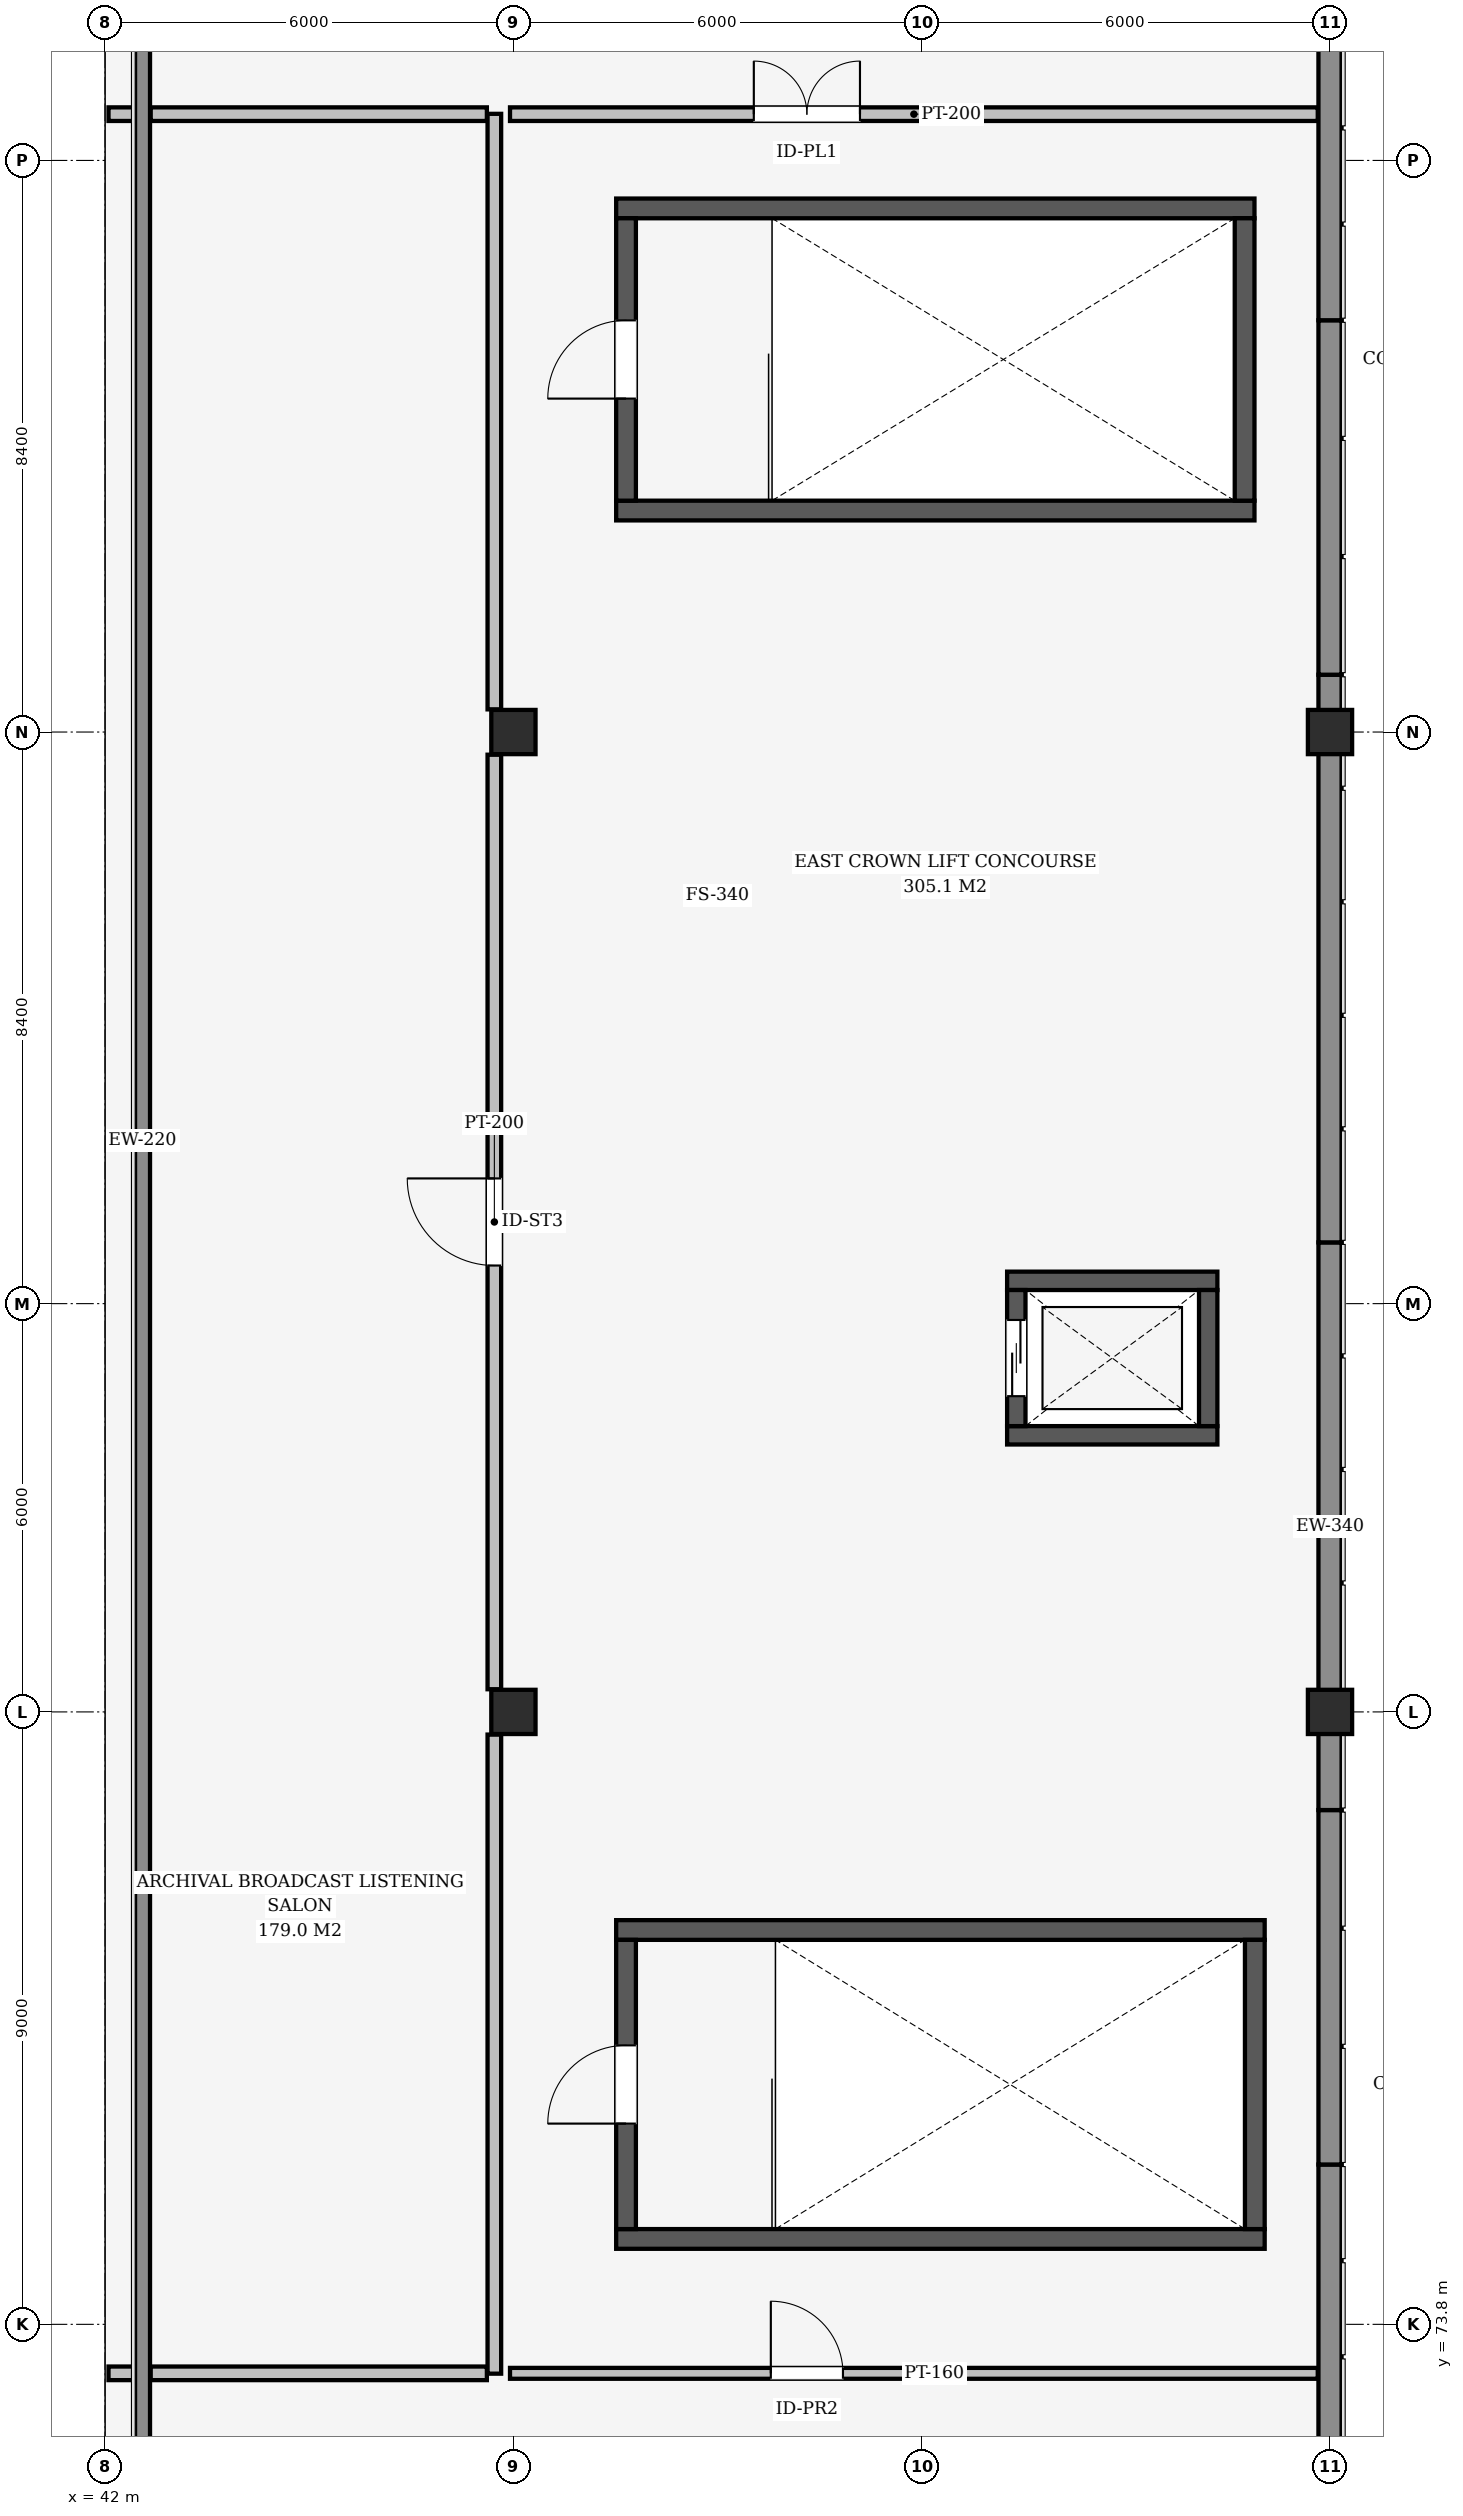
"""IFC4 building model, lengths in metres.
Left out: names, types, materials, properties, quantities, classifications, styles, units other than length and angle.
Written with IfcOpenShell. Run it as: python <this file> out.ifc"""

import sys

from ifc_helpers import new_model, si_unit, direction, frame, frame_2d, origin, origin_2d, place, context, subcontext, project, spatial, polyline, rectangle, outline, extrude, element, fill, save


model = new_model("IFC4")
c1 = context("Model", 3, precision=1e-05, world=origin(), true_north=direction((0.0, 1.0)))
c2 = subcontext(c1, "Body", "Model", "MODEL_VIEW")
j1 = project(units=[si_unit("LENGTHUNIT", "METRE"), si_unit("PLANEANGLEUNIT", "RADIAN")], contexts=[c1])
p1 = place(None, origin())
s1 = spatial("IfcSite", under=j1, at=p1, CompositionType="ELEMENT")
p2 = place(p1, origin())
s2 = spatial("IfcBuilding", under=s1, at=p2, CompositionType="ELEMENT")
p3 = place(p2, frame((0.0, 0.0, 22.2)))
s3 = spatial("IfcBuildingStorey", under=s2, at=p3, CompositionType="ELEMENT", Elevation=22.2)
for number, where, z_axis, x_axis in (
    (1, (48.0, 82.8, 0.0), (0.0, 0.0, 1.0), (1.0, 0.0, 0.0)),
    (2, (48.0, 97.2, 0.0), (0.0, 0.0, 1.0), (1.0, 0.0, 0.0)),
    (3, (60.0, 82.8, 0.0), (0.0, 0.0, 1.0), (1.0, 0.0, 0.0)),
    (4, (60.0, 97.2, 0.0), (0.0, 0.0, 1.0), (1.0, 0.0, 0.0)),
):
    element("IfcColumn", number, at=place(p3, frame(where, z_axis=z_axis, x_axis=x_axis)), inside=s3, PredefinedType="COLUMN", context=c2, shape_type="SweptSolid", body=[
        extrude(rectangle(XDim=0.65, YDim=0.65, at=origin_2d()), origin(), (0.0, 0.0, 1.0), 4.5),
    ])
p4 = place(p3, frame((42.55, 68.64, 0.0), z_axis=(0.0, 0.0, 1.0), x_axis=(0.0, 1.0, 0.0)))
e5 = element("IfcWall", 5, at=p4, inside=s3, PredefinedType="SOLIDWALL", context=c2, shape_type="SweptSolid", body=[
    extrude(rectangle(XDim=45.12, YDim=0.22, at=frame_2d((22.56, 0.0))), origin(), (0.0, 0.0, 1.0), 3.15),
])
p5 = place(p3, frame((60.0, 76.149, 0.0), z_axis=(0.0, 0.0, 1.0), x_axis=(0.0, -1.0, 0.0)))
e6 = element("IfcWall", 6, at=p5, inside=s3, PredefinedType="SOLIDWALL", context=c2, shape_type="SweptSolid", body=[
    extrude(outline(polyline([(0.0, 0.0), (4.24, 0.0), (4.24, 4.463), (0.0, 8.163), (0.0, 0.0)])), frame((0.0, 0.17, 0.0), z_axis=(0.0, -1.0, 0.0), x_axis=(1.0, 0.0, 0.0)), (0.0, 0.0, 1.0), 0.34),
])
p6 = place(p3, frame((60.0, 81.358, 0.0), z_axis=(0.0, 0.0, 1.0), x_axis=(0.0, -1.0, 0.0)))
e7 = element("IfcWall", 7, at=p6, inside=s3, PredefinedType="SOLIDWALL", context=c2, shape_type="SweptSolid", body=[
    extrude(outline(polyline([(0.0, 0.0), (5.209, 0.0), (5.209, 8.163), (0.0, 10.859), (0.0, 0.0)])), frame((0.0, 0.17, 0.0), z_axis=(0.0, -1.0, 0.0), x_axis=(1.0, 0.0, 0.0)), (0.0, 0.0, 1.0), 0.34),
])
p7 = place(p3, frame((60.0, 89.7, 0.0), z_axis=(0.0, 0.0, 1.0), x_axis=(0.0, -1.0, 0.0)))
e8 = element("IfcWall", 8, at=p7, inside=s3, PredefinedType="SOLIDWALL", context=c2, shape_type="SweptSolid", body=[
    extrude(outline(polyline([(0.0, 0.0), (8.342, 0.0), (8.342, 10.859), (0.0, 12.355), (0.0, 0.0)])), frame((0.0, 0.17, 0.0), z_axis=(0.0, -1.0, 0.0), x_axis=(1.0, 0.0, 0.0)), (0.0, 0.0, 1.0), 0.34),
])
p8 = place(p3, frame((60.0, 98.042, 0.0), z_axis=(0.0, 0.0, 1.0), x_axis=(0.0, -1.0, 0.0)))
e9 = element("IfcWall", 9, at=p8, inside=s3, PredefinedType="SOLIDWALL", context=c2, shape_type="SweptSolid", body=[
    extrude(outline(polyline([(0.0, 0.0), (8.342, 0.0), (8.342, 12.355), (0.0, 10.859), (0.0, 0.0)])), frame((0.0, 0.17, 0.0), z_axis=(0.0, -1.0, 0.0), x_axis=(1.0, 0.0, 0.0)), (0.0, 0.0, 1.0), 0.34),
])
p9 = place(p3, frame((60.0, 103.251, 0.0), z_axis=(0.0, 0.0, 1.0), x_axis=(0.0, -1.0, 0.0)))
e10 = element("IfcWall", 10, at=p9, inside=s3, PredefinedType="SOLIDWALL", context=c2, shape_type="SweptSolid", body=[
    extrude(outline(polyline([(0.0, 0.0), (5.209, 0.0), (5.209, 10.859), (0.0, 8.163), (0.0, 0.0)])), frame((0.0, 0.17, 0.0), z_axis=(0.0, -1.0, 0.0), x_axis=(1.0, 0.0, 0.0)), (0.0, 0.0, 1.0), 0.34),
])
p10 = place(p3, frame((60.0, 107.491, 0.0), z_axis=(0.0, 0.0, 1.0), x_axis=(0.0, -1.0, 0.0)))
e11 = element("IfcWall", 11, at=p10, inside=s3, PredefinedType="SOLIDWALL", context=c2, shape_type="SweptSolid", body=[
    extrude(outline(polyline([(0.0, 0.0), (4.24, 0.0), (4.24, 8.163), (0.0, 4.463), (0.0, 0.0)])), frame((0.0, 0.17, 0.0), z_axis=(0.0, -1.0, 0.0), x_axis=(1.0, 0.0, 0.0)), (0.0, 0.0, 1.0), 0.34),
])
for number, where, z_axis, x_axis in (
    (12, (49.51, 100.455, 0.0), (0.0, 0.0, 1.0), (1.0, 0.0, 0.0)),
    (13, (49.51, 104.895, 0.0), (0.0, 0.0, 1.0), (1.0, 0.0, 0.0)),
):
    element("IfcWall", number, at=place(p3, frame(where, z_axis=z_axis, x_axis=x_axis)), inside=s3, PredefinedType="SHEAR", context=c2, shape_type="SweptSolid", body=[
        extrude(rectangle(XDim=9.38, YDim=0.29, at=frame_2d((4.69, 0.0))), origin(), (0.0, 0.0, 1.0), 4.5),
    ])
p11 = place(p3, frame((49.655, 100.6, 0.0), z_axis=(0.0, 0.0, 1.0), x_axis=(0.0, 1.0, 0.0)))
e14 = element("IfcWall", 14, at=p11, inside=s3, PredefinedType="SHEAR", context=c2, shape_type="SweptSolid", body=[
    extrude(rectangle(XDim=4.15, YDim=0.29, at=frame_2d((2.075, 0.0))), origin(), (0.0, 0.0, 1.0), 4.5),
])
p12 = place(p11, frame((1.5, 0.0, 0.0)))
e15 = element("IfcOpeningElement", 15, at=p12, cuts=e14, PredefinedType="OPENING", context=c2, shape_type="SweptSolid", body=[
    extrude(rectangle(XDim=1.15, YDim=2.15, at=frame_2d((0.575, 1.075))), frame((0.0, 0.155, 0.0), z_axis=(0.0, -1.0, 0.0), x_axis=(1.0, 0.0, 0.0)), (0.0, 0.0, 1.0), 0.31),
])
p13 = place(p3, frame((58.745, 100.6, 0.0), z_axis=(0.0, 0.0, 1.0), x_axis=(0.0, 1.0, 0.0)))
e16 = element("IfcWall", 16, at=p13, inside=s3, PredefinedType="SHEAR", context=c2, shape_type="SweptSolid", body=[
    extrude(rectangle(XDim=4.15, YDim=0.29, at=frame_2d((2.075, 0.0))), origin(), (0.0, 0.0, 1.0), 4.5),
])
for number, where, z_axis, x_axis in (
    (17, (49.51, 75.055, 0.0), (0.0, 0.0, 1.0), (1.0, 0.0, 0.0)),
    (18, (49.51, 79.595, 0.0), (0.0, 0.0, 1.0), (1.0, 0.0, 0.0)),
):
    element("IfcWall", number, at=place(p3, frame(where, z_axis=z_axis, x_axis=x_axis)), inside=s3, PredefinedType="SHEAR", context=c2, shape_type="SweptSolid", body=[
        extrude(rectangle(XDim=9.53, YDim=0.29, at=frame_2d((4.765, 0.0))), origin(), (0.0, 0.0, 1.0), 4.5),
    ])
p14 = place(p3, frame((49.655, 75.2, 0.0), z_axis=(0.0, 0.0, 1.0), x_axis=(0.0, 1.0, 0.0)))
e19 = element("IfcWall", 19, at=p14, inside=s3, PredefinedType="SHEAR", context=c2, shape_type="SweptSolid", body=[
    extrude(rectangle(XDim=4.25, YDim=0.29, at=frame_2d((2.125, 0.0))), origin(), (0.0, 0.0, 1.0), 4.5),
])
p15 = place(p14, frame((1.55, 0.0, 0.0)))
e20 = element("IfcOpeningElement", 20, at=p15, cuts=e19, PredefinedType="OPENING", context=c2, shape_type="SweptSolid", body=[
    extrude(rectangle(XDim=1.15, YDim=2.15, at=frame_2d((0.575, 1.075))), frame((0.0, 0.155, 0.0), z_axis=(0.0, -1.0, 0.0), x_axis=(1.0, 0.0, 0.0)), (0.0, 0.0, 1.0), 0.31),
])
p16 = place(p3, frame((58.895, 75.2, 0.0), z_axis=(0.0, 0.0, 1.0), x_axis=(0.0, 1.0, 0.0)))
e21 = element("IfcWall", 21, at=p16, inside=s3, PredefinedType="SHEAR", context=c2, shape_type="SweptSolid", body=[
    extrude(rectangle(XDim=4.25, YDim=0.29, at=frame_2d((2.125, 0.0))), origin(), (0.0, 0.0, 1.0), 4.5),
])
for number, where, z_axis, x_axis in (
    (22, (55.255, 86.865, 0.0), (0.0, 0.0, 1.0), (1.0, 0.0, 0.0)),
    (23, (55.255, 89.135, 0.0), (0.0, 0.0, 1.0), (1.0, 0.0, 0.0)),
):
    element("IfcWall", number, at=place(p3, frame(where, z_axis=z_axis, x_axis=x_axis)), inside=s3, PredefinedType="SHEAR", context=c2, shape_type="SweptSolid", body=[
        extrude(rectangle(XDim=3.09, YDim=0.27, at=frame_2d((1.545, 0.0))), origin(), (0.0, 0.0, 1.0), 4.5),
    ])
p17 = place(p3, frame((55.39, 87.0, 0.0), z_axis=(0.0, 0.0, 1.0), x_axis=(0.0, 1.0, 0.0)))
e24 = element("IfcWall", 24, at=p17, inside=s3, PredefinedType="SHEAR", context=c2, shape_type="SweptSolid", body=[
    extrude(rectangle(XDim=2.0, YDim=0.27, at=frame_2d((1.0, 0.0))), origin(), (0.0, 0.0, 1.0), 4.5),
])
p18 = place(p17, frame((0.44, 0.0, 0.0)))
e25 = element("IfcOpeningElement", 25, at=p18, cuts=e24, PredefinedType="OPENING", context=c2, shape_type="SweptSolid", body=[
    extrude(rectangle(XDim=1.12, YDim=2.15, at=frame_2d((0.56, 1.075))), frame((0.0, 0.145, 0.0), z_axis=(0.0, -1.0, 0.0), x_axis=(1.0, 0.0, 0.0)), (0.0, 0.0, 1.0), 0.29),
])
p19 = place(p3, frame((58.21, 87.0, 0.0), z_axis=(0.0, 0.0, 1.0), x_axis=(0.0, 1.0, 0.0)))
e26 = element("IfcWall", 26, at=p19, inside=s3, PredefinedType="SHEAR", context=c2, shape_type="SweptSolid", body=[
    extrude(rectangle(XDim=2.0, YDim=0.27, at=frame_2d((1.0, 0.0))), origin(), (0.0, 0.0, 1.0), 4.5),
])
p20 = place(p3, frame((47.95, 73.08, 0.0), z_axis=(0.0, 0.0, 1.0), x_axis=(1.0, 0.0, 0.0)))
e27 = element("IfcWall", 27, at=p20, inside=s3, PredefinedType="PARTITIONING", context=c2, shape_type="SweptSolid", body=[
    extrude(rectangle(XDim=11.87, YDim=0.16, at=frame_2d((5.935, 0.0))), origin(), (0.0, 0.0, 1.0), 4.5),
])
p21 = place(p20, frame((3.833, 0.0, 0.0)))
e28 = element("IfcOpeningElement", 28, at=p21, cuts=e27, PredefinedType="OPENING", context=c2, shape_type="SweptSolid", body=[
    extrude(rectangle(XDim=1.06, YDim=2.22, at=frame_2d((0.53, 1.11))), frame((0.0, 0.09, 0.0), z_axis=(0.0, -1.0, 0.0), x_axis=(1.0, 0.0, 0.0)), (0.0, 0.0, 1.0), 0.18),
])
p22 = place(p3, frame((47.72, 73.075, 0.0), z_axis=(0.0, 0.0, 1.0), x_axis=(0.0, 1.0, 0.0)))
e29 = element("IfcWall", 29, at=p22, inside=s3, PredefinedType="PARTITIONING", context=c2, shape_type="SweptSolid", body=[
    extrude(rectangle(XDim=9.392, YDim=0.2, at=frame_2d((4.696, 0.0))), origin(), (0.0, 0.0, 1.0), 4.5),
])
p23 = place(p3, frame((47.72, 83.133, 0.0), z_axis=(0.0, 0.0, 1.0), x_axis=(0.0, 1.0, 0.0)))
e30 = element("IfcWall", 30, at=p23, inside=s3, PredefinedType="PARTITIONING", context=c2, shape_type="SweptSolid", body=[
    extrude(rectangle(XDim=13.734, YDim=0.2, at=frame_2d((6.867, 0.0))), origin(), (0.0, 0.0, 1.0), 4.5),
])
p24 = place(p23, frame((6.227, 0.0, 0.0)))
e31 = element("IfcOpeningElement", 31, at=p24, cuts=e30, PredefinedType="OPENING", context=c2, shape_type="SweptSolid", body=[
    extrude(rectangle(XDim=1.28, YDim=2.26, at=frame_2d((0.64, 1.13))), frame((0.0, 0.11, 0.0), z_axis=(0.0, -1.0, 0.0), x_axis=(1.0, 0.0, 0.0)), (0.0, 0.0, 1.0), 0.22),
])
p25 = place(p3, frame((47.72, 97.533, 0.0), z_axis=(0.0, 0.0, 1.0), x_axis=(0.0, 1.0, 0.0)))
e32 = element("IfcWall", 32, at=p25, inside=s3, PredefinedType="PARTITIONING", context=c2, shape_type="SweptSolid", body=[
    extrude(rectangle(XDim=8.752, YDim=0.2, at=frame_2d((4.376, 0.0))), origin(), (0.0, 0.0, 1.0), 4.5),
])
p26 = place(p3, frame((47.95, 106.28, 0.0), z_axis=(0.0, 0.0, 1.0), x_axis=(1.0, 0.0, 0.0)))
e33 = element("IfcWall", 33, at=p26, inside=s3, PredefinedType="PARTITIONING", context=c2, shape_type="SweptSolid", body=[
    extrude(rectangle(XDim=11.87, YDim=0.2, at=frame_2d((5.935, 0.0))), origin(), (0.0, 0.0, 1.0), 4.5),
])
p27 = place(p26, frame((3.583, 0.0, 0.0)))
e34 = element("IfcOpeningElement", 34, at=p27, cuts=e33, PredefinedType="OPENING", context=c2, shape_type="SweptSolid", body=[
    extrude(rectangle(XDim=1.56, YDim=2.26, at=frame_2d((0.78, 1.13))), frame((0.0, 0.11, 0.0), z_axis=(0.0, -1.0, 0.0), x_axis=(1.0, 0.0, 0.0)), (0.0, 0.0, 1.0), 0.22),
])
p28 = place(p3, frame((42.05, 73.08, 0.0), z_axis=(0.0, 0.0, 1.0), x_axis=(1.0, 0.0, 0.0)))
e35 = element("IfcWall", 35, at=p28, inside=s3, PredefinedType="PARTITIONING", context=c2, shape_type="SweptSolid", body=[
    extrude(rectangle(XDim=0.38, YDim=0.2, at=frame_2d((0.19, 0.0))), origin(), (0.0, 0.0, 1.0), 4.5),
])
p29 = place(p3, frame((42.67, 73.08, 0.0), z_axis=(0.0, 0.0, 1.0), x_axis=(1.0, 0.0, 0.0)))
e36 = element("IfcWall", 36, at=p29, inside=s3, PredefinedType="PARTITIONING", context=c2, shape_type="SweptSolid", body=[
    extrude(rectangle(XDim=4.94, YDim=0.2, at=frame_2d((2.47, 0.0))), origin(), (0.0, 0.0, 1.0), 4.5),
])
p30 = place(p3, frame((42.05, 106.28, 0.0), z_axis=(0.0, 0.0, 1.0), x_axis=(1.0, 0.0, 0.0)))
e37 = element("IfcWall", 37, at=p30, inside=s3, PredefinedType="PARTITIONING", context=c2, shape_type="SweptSolid", body=[
    extrude(rectangle(XDim=0.38, YDim=0.2, at=frame_2d((0.19, 0.0))), origin(), (0.0, 0.0, 1.0), 4.5),
])
p31 = place(p3, frame((42.67, 106.28, 0.0), z_axis=(0.0, 0.0, 1.0), x_axis=(1.0, 0.0, 0.0)))
e38 = element("IfcWall", 38, at=p31, inside=s3, PredefinedType="PARTITIONING", context=c2, shape_type="SweptSolid", body=[
    extrude(rectangle(XDim=4.94, YDim=0.2, at=frame_2d((2.47, 0.0))), origin(), (0.0, 0.0, 1.0), 4.5),
])
p32 = place(p12, origin())
e39 = element("IfcDoor", 39, at=p32, inside=s3, OperationType="SINGLE_SWING_LEFT", PredefinedType="DOOR", context=c2, shape_type="SweptSolid", body=[
    extrude(rectangle(XDim=1.15, YDim=2.15, at=frame_2d((0.575, 1.075))), frame((0.0, 0.025, 0.0), z_axis=(0.0, -1.0, 0.0), x_axis=(1.0, 0.0, 0.0)), (0.0, 0.0, 1.0), 0.05),
])
fill(e15, e39)
p33 = place(p15, origin())
e40 = element("IfcDoor", 40, at=p33, inside=s3, OperationType="SINGLE_SWING_LEFT", PredefinedType="DOOR", context=c2, shape_type="SweptSolid", body=[
    extrude(rectangle(XDim=1.15, YDim=2.15, at=frame_2d((0.575, 1.075))), frame((0.0, 0.025, 0.0), z_axis=(0.0, -1.0, 0.0), x_axis=(1.0, 0.0, 0.0)), (0.0, 0.0, 1.0), 0.05),
])
fill(e20, e40)
p34 = place(p18, origin())
e41 = element("IfcDoor", 41, at=p34, inside=s3, OperationType="SLIDING_TO_LEFT", PredefinedType="DOOR", context=c2, shape_type="SweptSolid", body=[
    extrude(rectangle(XDim=1.12, YDim=2.15, at=frame_2d((0.56, 1.075))), frame((0.0, 0.025, 0.0), z_axis=(0.0, -1.0, 0.0), x_axis=(1.0, 0.0, 0.0)), (0.0, 0.0, 1.0), 0.05),
])
fill(e25, e41)
p35 = place(p21, origin())
e42 = element("IfcDoor", 42, at=p35, inside=s3, OperationType="SINGLE_SWING_LEFT", PredefinedType="DOOR", context=c2, shape_type="SweptSolid", body=[
    extrude(rectangle(XDim=1.06, YDim=2.22, at=frame_2d((0.53, 1.11))), frame((0.0, 0.025, 0.0), z_axis=(0.0, -1.0, 0.0), x_axis=(1.0, 0.0, 0.0)), (0.0, 0.0, 1.0), 0.05),
])
fill(e28, e42)
p36 = place(p24, origin())
e43 = element("IfcDoor", 43, at=p36, inside=s3, OperationType="SINGLE_SWING_RIGHT", PredefinedType="DOOR", context=c2, shape_type="SweptSolid", body=[
    extrude(rectangle(XDim=1.28, YDim=2.26, at=frame_2d((0.64, 1.13))), frame((0.0, 0.025, 0.0), z_axis=(0.0, -1.0, 0.0), x_axis=(1.0, 0.0, 0.0)), (0.0, 0.0, 1.0), 0.05),
])
fill(e31, e43)
p37 = place(p27, origin())
e44 = element("IfcDoor", 44, at=p37, inside=s3, OperationType="DOUBLE_DOOR_SINGLE_SWING", PredefinedType="DOOR", context=c2, shape_type="SweptSolid", body=[
    extrude(rectangle(XDim=1.56, YDim=2.26, at=frame_2d((0.78, 1.13))), frame((0.0, 0.025, 0.0), z_axis=(0.0, -1.0, 0.0), x_axis=(1.0, 0.0, 0.0)), (0.0, 0.0, 1.0), 0.05),
])
fill(e34, e44)
save(model, sys.argv[1])
